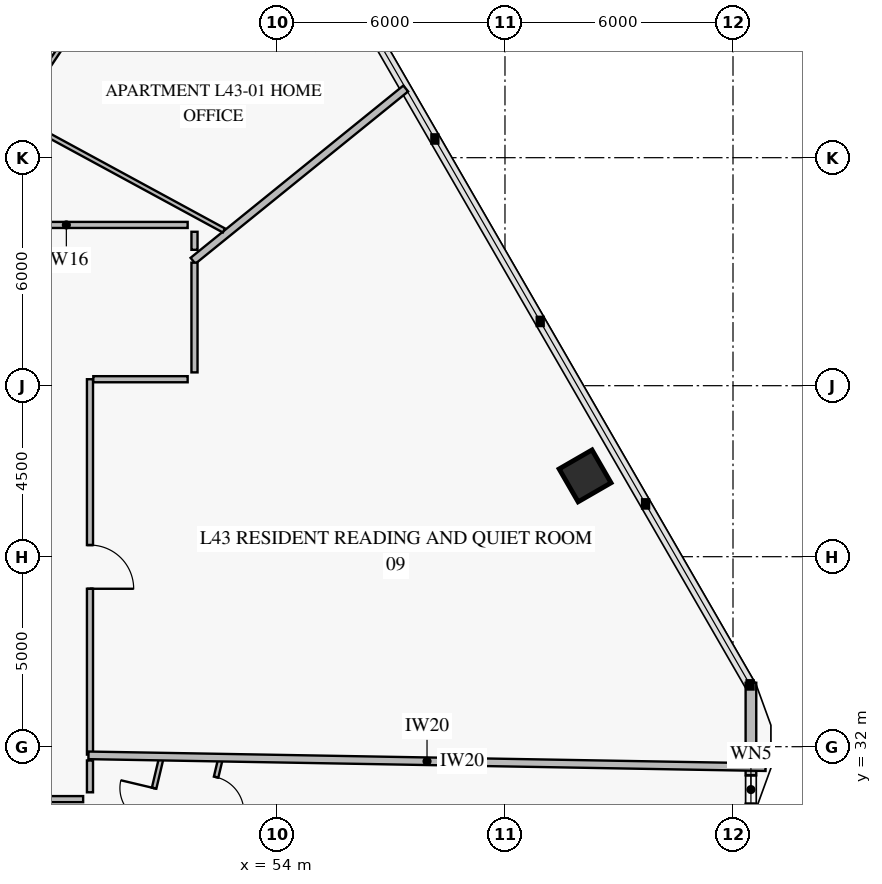
"""IFC4 building model, lengths in metres.
Left out: names, types, materials, properties, quantities, classifications, styles, units other than length and angle.
Written with IfcOpenShell. Run it as: python <this file> out.ifc"""

import sys

from ifc_helpers import new_model, si_unit, direction, frame, frame_2d, origin, origin_2d, place, context, subcontext, project, spatial, rectangle, extrude, element, fill, save


model = new_model("IFC4")
c1 = context("Model", 3, precision=1e-05, world=origin(), true_north=direction((0.0, 1.0)))
c2 = subcontext(c1, "Body", "Model", "MODEL_VIEW")
j1 = project(units=[si_unit("LENGTHUNIT", "METRE"), si_unit("PLANEANGLEUNIT", "RADIAN")], contexts=[c1])
p1 = place(None, origin())
s1 = spatial("IfcSite", under=j1, at=p1, CompositionType="ELEMENT")
p2 = place(p1, origin())
s2 = spatial("IfcBuilding", under=s1, at=p2, CompositionType="ELEMENT")
p3 = place(p2, frame((0.0, 0.0, 173.2)))
s3 = spatial("IfcBuildingStorey", under=s2, at=p3, CompositionType="ELEMENT", Elevation=173.2)
p4 = place(p3, frame((62.108, 39.126, 0.0), z_axis=(0.0, 0.0, 1.0), x_axis=(-0.5, 0.866025403784, 0.0)))
e1 = element("IfcColumn", 1, at=p4, inside=s3, PredefinedType="COLUMN", context=c2, shape_type="SweptSolid", body=[
    extrude(rectangle(XDim=1.0, YDim=1.0, at=origin_2d()), origin(), (0.0, 0.0, 1.0), 3.55),
])
p5 = place(p3, frame((66.472, 33.683, 0.0), z_axis=(0.0, 0.0, 1.0), x_axis=(0.0, -1.0, 0.0)))
e2 = element("IfcWall", 2, at=p5, inside=s3, PredefinedType="SOLIDWALL", context=c2, shape_type="SweptSolid", body=[
    extrude(rectangle(XDim=3.365, YDim=0.28, at=frame_2d((1.683, 0.0))), origin(), (0.0, 0.0, 1.0), 3.55),
])
p6 = place(p5, frame((2.436, 0.0, 0.85)))
e3 = element("IfcOpeningElement", 3, at=p6, cuts=e2, PredefinedType="OPENING", context=c2, shape_type="SweptSolid", body=[
    extrude(rectangle(XDim=0.75, YDim=1.5, at=frame_2d((0.375, 0.75))), frame((0.0, 0.152, 0.0), z_axis=(0.0, -1.0, 0.0), x_axis=(1.0, 0.0, 0.0)), (0.0, 0.0, 1.0), 0.304),
])
p7 = place(p3, frame((47.766, 49.589, 0.0), z_axis=(0.0, 0.0, 1.0), x_axis=(0.556024553712, 0.831165865317, 0.0)))
e4 = element("IfcWall", 4, at=p7, inside=s3, PredefinedType="PARTITIONING", context=c2, shape_type="SweptSolid", body=[
    extrude(rectangle(XDim=5.698, YDim=0.12, at=frame_2d((2.849, 0.0))), origin(), (0.0, 0.0, 1.0), 2.87),
])
p8 = place(p7, frame((1.753, 0.0, 0.0)))
e5 = element("IfcOpeningElement", 5, at=p8, cuts=e4, PredefinedType="OPENING", context=c2, shape_type="SweptSolid", body=[
    extrude(rectangle(XDim=0.95, YDim=2.1, at=frame_2d((0.475, 1.05))), frame((0.0, 0.072, 0.0), z_axis=(0.0, -1.0, 0.0), x_axis=(1.0, 0.0, 0.0)), (0.0, 0.0, 1.0), 0.144),
])
p9 = place(p3, frame((49.496, 25.545, 0.0), z_axis=(0.0, 0.0, 1.0), x_axis=(0.230738150412, 0.973015881651, 0.0)))
e6 = element("IfcWall", 6, at=p9, inside=s3, PredefinedType="PARTITIONING", context=c2, shape_type="SweptSolid", body=[
    extrude(rectangle(XDim=6.335, YDim=0.12, at=frame_2d((3.167, 0.0))), origin(), (0.0, 0.0, 1.0), 2.9),
])
p10 = place(p9, frame((1.523, 0.0, 0.0)))
e7 = element("IfcOpeningElement", 7, at=p10, cuts=e6, PredefinedType="OPENING", context=c2, shape_type="SweptSolid", body=[
    extrude(rectangle(XDim=0.95, YDim=2.1, at=frame_2d((0.475, 1.05))), frame((0.0, 0.072, 0.0), z_axis=(0.0, -1.0, 0.0), x_axis=(1.0, 0.0, 0.0)), (0.0, 0.0, 1.0), 0.144),
])
p11 = place(p9, frame((4.613, 0.0, 0.0)))
e8 = element("IfcOpeningElement", 8, at=p11, cuts=e6, PredefinedType="OPENING", context=c2, shape_type="SweptSolid", body=[
    extrude(rectangle(XDim=0.9, YDim=2.1, at=frame_2d((0.45, 1.05))), frame((0.0, 0.072, 0.0), z_axis=(0.0, -1.0, 0.0), x_axis=(1.0, 0.0, 0.0)), (0.0, 0.0, 1.0), 0.144),
])
p12 = place(p3, frame((50.901, 24.884, 0.0), z_axis=(0.0, 0.0, 1.0), x_axis=(0.230727269758, 0.973018461793, 0.0)))
e9 = element("IfcWall", 9, at=p12, inside=s3, PredefinedType="PARTITIONING", context=c2, shape_type="SweptSolid", body=[
    extrude(rectangle(XDim=6.972, YDim=0.12, at=frame_2d((3.486, 0.0))), origin(), (0.0, 0.0, 1.0), 2.9),
])
p13 = place(p12, frame((0.481, 0.0, 0.0)))
e10 = element("IfcOpeningElement", 10, at=p13, cuts=e9, PredefinedType="OPENING", context=c2, shape_type="SweptSolid", body=[
    extrude(rectangle(XDim=0.95, YDim=2.1, at=frame_2d((0.475, 1.05))), frame((0.0, 0.072, 0.0), z_axis=(0.0, -1.0, 0.0), x_axis=(1.0, 0.0, 0.0)), (0.0, 0.0, 1.0), 0.144),
])
p14 = place(p12, frame((2.174, 0.0, 0.0)))
e11 = element("IfcOpeningElement", 11, at=p14, cuts=e9, PredefinedType="OPENING", context=c2, shape_type="SweptSolid", body=[
    extrude(rectangle(XDim=0.95, YDim=2.1, at=frame_2d((0.475, 1.05))), frame((0.0, 0.072, 0.0), z_axis=(0.0, -1.0, 0.0), x_axis=(1.0, 0.0, 0.0)), (0.0, 0.0, 1.0), 0.144),
])
p15 = place(p12, frame((3.848, 0.0, 0.0)))
e12 = element("IfcOpeningElement", 12, at=p15, cuts=e9, PredefinedType="OPENING", context=c2, shape_type="SweptSolid", body=[
    extrude(rectangle(XDim=0.95, YDim=2.1, at=frame_2d((0.475, 1.05))), frame((0.0, 0.072, 0.0), z_axis=(0.0, -1.0, 0.0), x_axis=(1.0, 0.0, 0.0)), (0.0, 0.0, 1.0), 0.144),
])
p16 = place(p12, frame((5.541, 0.0, 0.0)))
e13 = element("IfcOpeningElement", 13, at=p16, cuts=e9, PredefinedType="OPENING", context=c2, shape_type="SweptSolid", body=[
    extrude(rectangle(XDim=0.95, YDim=2.1, at=frame_2d((0.475, 1.05))), frame((0.0, 0.072, 0.0), z_axis=(0.0, -1.0, 0.0), x_axis=(1.0, 0.0, 0.0)), (0.0, 0.0, 1.0), 0.144),
])
p17 = place(p3, frame((49.08, 31.792, 0.0), z_axis=(0.0, 0.0, 1.0), x_axis=(0.0, 1.0, 0.0)))
e14 = element("IfcWall", 14, at=p17, inside=s3, PredefinedType="PARTITIONING", context=c2, shape_type="SweptSolid", body=[
    extrude(rectangle(XDim=9.878, YDim=0.16, at=frame_2d((4.939, 0.0))), origin(), (0.0, 0.0, 1.0), 2.9),
])
p18 = place(p17, frame((4.364, 0.0, 0.0)))
e15 = element("IfcOpeningElement", 15, at=p18, cuts=e14, PredefinedType="OPENING", context=c2, shape_type="SweptSolid", body=[
    extrude(rectangle(XDim=1.15, YDim=2.2, at=frame_2d((0.575, 1.1))), frame((0.0, 0.092, 0.0), z_axis=(0.0, -1.0, 0.0), x_axis=(1.0, 0.0, 0.0)), (0.0, 0.0, 1.0), 0.184),
])
p19 = place(p3, frame((51.79, 44.787, 0.0), z_axis=(0.0, 0.0, 1.0), x_axis=(0.777161996324, 0.629300589122, 0.0)))
e16 = element("IfcWall", 16, at=p19, inside=s3, PredefinedType="PARTITIONING", context=c2, shape_type="SweptSolid", body=[
    extrude(rectangle(XDim=7.204, YDim=0.2, at=frame_2d((3.602, 0.0))), origin(), (0.0, 0.0, 1.0), 2.87),
])
p20 = place(p3, frame((52.604, 45.585, 0.0), z_axis=(0.0, 0.0, 1.0), x_axis=(-0.878827510453, 0.477139609413, 0.0)))
e17 = element("IfcWall", 17, at=p20, inside=s3, PredefinedType="PARTITIONING", context=c2, shape_type="SweptSolid", body=[
    extrude(rectangle(XDim=6.206, YDim=0.12, at=frame_2d((3.103, 0.0))), origin(), (0.0, 0.0, 1.0), 2.9),
])
p21 = place(p3, frame((49.04, 31.772, 0.0), z_axis=(0.0, 0.0, 1.0), x_axis=(0.999847668402, -0.017453939101, 0.0)))
e18 = element("IfcWall", 18, at=p21, inside=s3, PredefinedType="PARTITIONING", context=c2, shape_type="SweptSolid", body=[
    extrude(rectangle(XDim=17.82, YDim=0.2, at=frame_2d((8.91, 0.0))), origin(), (0.0, 0.0, 1.0), 2.87),
])
p22 = place(p3, frame((51.65, 45.73, 0.0), z_axis=(0.0, 0.0, 1.0), x_axis=(-1.0, 0.0, 0.0)))
e19 = element("IfcWall", 19, at=p22, inside=s3, PredefinedType="PARTITIONING", context=c2, shape_type="SweptSolid", body=[
    extrude(rectangle(XDim=6.384, YDim=0.16, at=frame_2d((3.192, 0.0))), origin(), (0.0, 0.0, 1.0), 2.9),
])
p23 = place(p3, frame((51.83, 45.075, 0.0), z_axis=(0.0, 0.0, 1.0), x_axis=(0.0, 1.0, 0.0)))
e20 = element("IfcWall", 20, at=p23, inside=s3, PredefinedType="PARTITIONING", context=c2, shape_type="SweptSolid", body=[
    extrude(rectangle(XDim=0.475, YDim=0.16, at=frame_2d((0.237, 0.0))), origin(), (0.0, 0.0, 1.0), 3.55),
])
p24 = place(p3, frame((46.87, 30.62, 0.0), z_axis=(0.0, 0.0, 1.0), x_axis=(1.0, 0.0, 0.0)))
e21 = element("IfcWall", 21, at=p24, inside=s3, PredefinedType="PARTITIONING", context=c2, shape_type="SweptSolid", body=[
    extrude(rectangle(XDim=2.03, YDim=0.16, at=frame_2d((1.015, 0.0))), origin(), (0.0, 0.0, 1.0), 3.55),
])
p25 = place(p3, frame((49.08, 30.8, 0.0), z_axis=(0.0, 0.0, 1.0), x_axis=(0.0, 1.0, 0.0)))
e22 = element("IfcWall", 22, at=p25, inside=s3, PredefinedType="PARTITIONING", context=c2, shape_type="SweptSolid", body=[
    extrude(rectangle(XDim=0.837, YDim=0.16, at=frame_2d((0.419, 0.0))), origin(), (0.0, 0.0, 1.0), 3.55),
])
p26 = place(p3, frame((51.83, 41.85, 0.0), z_axis=(0.0, 0.0, 1.0), x_axis=(0.0, 1.0, 0.0)))
e23 = element("IfcWall", 23, at=p26, inside=s3, PredefinedType="PARTITIONING", context=c2, shape_type="SweptSolid", body=[
    extrude(rectangle(XDim=2.887, YDim=0.16, at=frame_2d((1.443, 0.0))), origin(), (0.0, 0.0, 1.0), 3.15),
])
p27 = place(p3, frame((49.168, 41.67, 0.0), z_axis=(0.0, 0.0, 1.0), x_axis=(1.0, 0.0, 0.0)))
e24 = element("IfcWall", 24, at=p27, inside=s3, PredefinedType="PARTITIONING", context=c2, shape_type="SweptSolid", body=[
    extrude(rectangle(XDim=2.482, YDim=0.16, at=frame_2d((1.241, 0.0))), origin(), (0.0, 0.0, 1.0), 3.55),
])
p28 = place(p6, origin())
e25 = element("IfcWindow", 25, at=p28, inside=s3, PartitioningType="SINGLE_PANEL", PredefinedType="WINDOW", context=c2, shape_type="SweptSolid", body=[
    extrude(rectangle(XDim=0.75, YDim=1.5, at=frame_2d((0.375, 0.75))), frame((0.0, 0.03, 0.0), z_axis=(0.0, -1.0, 0.0), x_axis=(1.0, 0.0, 0.0)), (0.0, 0.0, 1.0), 0.06),
])
fill(e3, e25)
p29 = place(p11, origin())
e26 = element("IfcDoor", 26, at=p29, inside=s3, OperationType="SINGLE_SWING_RIGHT", PredefinedType="DOOR", context=c2, shape_type="SweptSolid", body=[
    extrude(rectangle(XDim=0.9, YDim=2.1, at=frame_2d((0.45, 1.05))), frame((0.0, 0.025, 0.0), z_axis=(0.0, -1.0, 0.0), x_axis=(1.0, 0.0, 0.0)), (0.0, 0.0, 1.0), 0.05),
])
fill(e8, e26)
p30 = place(p16, frame((0.95, 0.0, 0.0), z_axis=(0.0, 0.0, 1.0), x_axis=(-1.0, 0.0, 0.0)))
e27 = element("IfcDoor", 27, at=p30, inside=s3, OperationType="SINGLE_SWING_RIGHT", PredefinedType="DOOR", context=c2, shape_type="SweptSolid", body=[
    extrude(rectangle(XDim=0.95, YDim=2.1, at=frame_2d((0.475, 1.05))), frame((0.0, 0.025, 0.0), z_axis=(0.0, -1.0, 0.0), x_axis=(1.0, 0.0, 0.0)), (0.0, 0.0, 1.0), 0.05),
])
fill(e13, e27)
p31 = place(p18, frame((1.15, 0.0, 0.0), z_axis=(0.0, 0.0, 1.0), x_axis=(-1.0, 0.0, 0.0)))
e28 = element("IfcDoor", 28, at=p31, inside=s3, OperationType="SINGLE_SWING_RIGHT", PredefinedType="DOOR", context=c2, shape_type="SweptSolid", body=[
    extrude(rectangle(XDim=1.15, YDim=2.2, at=frame_2d((0.575, 1.1))), frame((0.0, 0.025, 0.0), z_axis=(0.0, -1.0, 0.0), x_axis=(1.0, 0.0, 0.0)), (0.0, 0.0, 1.0), 0.05),
])
fill(e15, e28)
save(model, sys.argv[1])
